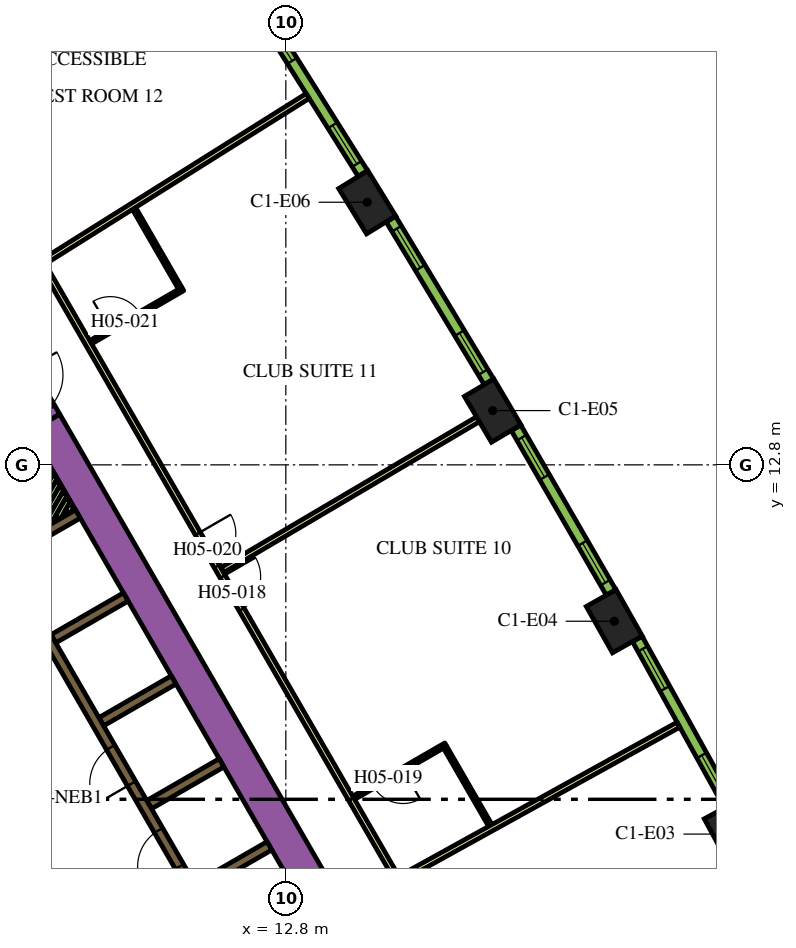
"""IFC4 building model, lengths in metres.
Left out: names, types, materials, properties, quantities, classifications, styles, units other than length and angle.
Written with IfcOpenShell. Run it as: python <this file> out.ifc"""

import sys

from ifc_helpers import new_model, si_unit, direction, frame, frame_2d, origin, origin_2d, place, context, subcontext, project, spatial, rectangle, extrude, element, fill, save


model = new_model("IFC4")
c1 = context("Model", 3, precision=1e-05, world=origin(), true_north=direction((0.0, 1.0)))
c2 = subcontext(c1, "Body", "Model", "MODEL_VIEW")
j1 = project(units=[si_unit("LENGTHUNIT", "METRE"), si_unit("PLANEANGLEUNIT", "RADIAN")], contexts=[c1])
p1 = place(None, origin())
s1 = spatial("IfcSite", under=j1, at=p1, CompositionType="ELEMENT")
p2 = place(p1, origin())
s2 = spatial("IfcBuilding", under=s1, at=p2, CompositionType="ELEMENT")
p3 = place(p2, frame((0.0, 0.0, 74.4)))
s3 = spatial("IfcBuildingStorey", under=s2, at=p3, CompositionType="ELEMENT", Elevation=74.4)
for number, where, z_axis, x_axis in (
    (1, (24.54, 3.085, 0.0), (0.0, 0.0, 1.0), (-0.476, 0.88, 0.0)),
    (2, (21.443, 8.685, 0.0), (0.0, 0.0, 1.0), (-0.492, 0.871, 0.0)),
    (3, (18.243, 14.228, 0.0), (0.0, 0.0, 1.0), (-0.508, 0.861, 0.0)),
    (4, (14.942, 19.71, 0.0), (0.0, 0.0, 1.0), (-0.524, 0.852, 0.0)),
):
    element("IfcColumn", number, at=place(p3, frame(where, z_axis=z_axis, x_axis=x_axis)), inside=s3, PredefinedType="COLUMN", context=c2, shape_type="SweptSolid", body=[
        extrude(rectangle(XDim=1.4, YDim=0.9, at=origin_2d()), origin(), (0.0, 0.0, 1.0), 3.9),
    ])
p4 = place(p3, frame((6.461, 13.909, 0.0), z_axis=(0.0, 0.0, 1.0), x_axis=(0.500005804227, -0.866022052686, 0.0)))
e5 = element("IfcWall", 5, at=p4, inside=s3, PredefinedType="SOLIDWALL", context=c2, shape_type="SweptSolid", body=[
    extrude(rectangle(XDim=20.834, YDim=0.9, at=frame_2d((10.417, 0.0))), origin(), (0.0, 0.0, 1.0), 3.9),
])
for number, where, z_axis, x_axis in (
    (6, (10.464, 1.677, 0.0), (0.0, 0.0, 1.0), (0.866, 0.5, 0.0)),
    (7, (9.204, 3.859, 0.0), (0.0, 0.0, 1.0), (0.866, 0.5, 0.0)),
    (8, (7.944, 6.041, 0.0), (0.0, 0.0, 1.0), (0.866, 0.5, 0.0)),
    (9, (6.684, 8.224, 0.0), (0.0, 0.0, 1.0), (0.866, 0.5, 0.0)),
):
    element("IfcWall", number, at=place(p3, frame(where, z_axis=z_axis, x_axis=x_axis)), inside=s3, PredefinedType="SOLIDWALL", context=c2, shape_type="SweptSolid", body=[
        extrude(rectangle(XDim=2.2, YDim=0.25, at=frame_2d((1.1, 0.0))), origin(), (0.0, 0.0, 1.0), 3.9),
    ])
p5 = place(p3, frame((4.776, 10.032, 0.0), z_axis=(0.0, 0.0, 1.0), x_axis=(0.86600215702, 0.500040262416, 0.0)))
e10 = element("IfcWall", 10, at=p5, inside=s3, PredefinedType="SOLIDWALL", context=c2, shape_type="SweptSolid", body=[
    extrude(rectangle(XDim=2.948, YDim=0.25, at=frame_2d((1.474, 0.0))), origin(), (0.0, 0.0, 1.0), 3.9),
])
p6 = place(p3, frame((5.501, 10.659, 0.0), z_axis=(0.0, 0.0, 1.0), x_axis=(0.499951092774, 0.866053638543, 0.0)))
e11 = element("IfcWall", 11, at=p6, inside=s3, PredefinedType="PARTITIONING", context=c2, shape_type="SweptSolid", body=[
    extrude(rectangle(XDim=2.28, YDim=0.15, at=frame_2d((1.14, 0.0))), origin(), (0.0, 0.0, 1.0), 2.7),
])
p7 = place(p3, frame((5.761, 10.809, 0.0), z_axis=(0.0, 0.0, 1.0), x_axis=(0.499900985997, 0.866082561999, 0.0)))
e12 = element("IfcWall", 12, at=p7, inside=s3, PredefinedType="PARTITIONING", context=c2, shape_type="SweptSolid", body=[
    extrude(rectangle(XDim=1.934, YDim=0.15, at=frame_2d((0.967, 0.0))), origin(), (0.0, 0.0, 1.0), 2.7),
])
p8 = place(p3, frame((6.021, 10.959, 0.0), z_axis=(0.0, 0.0, 1.0), x_axis=(0.499944387978, 0.86605750902, 0.0)))
e13 = element("IfcWall", 13, at=p8, inside=s3, PredefinedType="PARTITIONING", context=c2, shape_type="SweptSolid", body=[
    extrude(rectangle(XDim=1.587, YDim=0.15, at=frame_2d((0.793, 0.0))), origin(), (0.0, 0.0, 1.0), 2.7),
])
p9 = place(p3, frame((6.281, 11.109, 0.0), z_axis=(0.0, 0.0, 1.0), x_axis=(0.500012022864, 0.866018462269, 0.0)))
e14 = element("IfcWall", 14, at=p9, inside=s3, PredefinedType="PARTITIONING", context=c2, shape_type="SweptSolid", body=[
    extrude(rectangle(XDim=1.241, YDim=0.15, at=frame_2d((0.62, 0.0))), origin(), (0.0, 0.0, 1.0), 2.7),
])
p10 = place(p3, frame((6.541, 11.259, 0.0), z_axis=(0.0, 0.0, 1.0), x_axis=(0.500132045864, 0.865949153646, 0.0)))
e15 = element("IfcWall", 15, at=p10, inside=s3, PredefinedType="PARTITIONING", context=c2, shape_type="SweptSolid", body=[
    extrude(rectangle(XDim=0.894, YDim=0.15, at=frame_2d((0.447, 0.0))), origin(), (0.0, 0.0, 1.0), 2.7),
])
p11 = place(p3, frame((6.8, 11.409, 0.0), z_axis=(0.0, 0.0, 1.0), x_axis=(0.500210807569, 0.865903659763, 0.0)))
e16 = element("IfcWall", 16, at=p11, inside=s3, PredefinedType="PARTITIONING", context=c2, shape_type="SweptSolid", body=[
    extrude(rectangle(XDim=0.548, YDim=0.15, at=frame_2d((0.274, 0.0))), origin(), (0.0, 0.0, 1.0), 2.7),
])
p12 = place(p3, frame((7.06, 11.559, 0.0), z_axis=(0.0, 0.0, 1.0), x_axis=(0.499267785915, 0.866447735266, 0.0)))
e17 = element("IfcWall", 17, at=p12, inside=s3, PredefinedType="PARTITIONING", context=c2, shape_type="SweptSolid", body=[
    extrude(rectangle(XDim=0.201, YDim=0.15, at=frame_2d((0.101, 0.0))), origin(), (0.0, 0.0, 1.0), 2.7),
])
p13 = place(p3, frame((11.553, -0.46, 0.0), z_axis=(0.0, 0.0, 1.0), x_axis=(-0.500006514828, 0.866021642414, 0.0)))
e18 = element("IfcWall", 18, at=p13, inside=s3, PredefinedType="SOLIDWALL", context=c2, shape_type="SweptSolid", body=[
    extrude(rectangle(XDim=12.35, YDim=0.25, at=frame_2d((6.175, 0.0))), origin(), (0.0, 0.0, 1.0), 3.9),
])
p14 = place(p13, frame((0.585, 0.0, 0.0)))
e19 = element("IfcOpeningElement", 19, at=p14, cuts=e18, PredefinedType="OPENING", context=c2, shape_type="SweptSolid", body=[
    extrude(rectangle(XDim=1.1, YDim=2.1, at=frame_2d((0.55, 1.05))), frame((0.0, 0.135, 0.0), z_axis=(0.0, -1.0, 0.0), x_axis=(1.0, 0.0, 0.0)), (0.0, 0.0, 1.0), 0.27),
])
p15 = place(p13, frame((3.105, 0.0, 0.0)))
e20 = element("IfcOpeningElement", 20, at=p15, cuts=e18, PredefinedType="OPENING", context=c2, shape_type="SweptSolid", body=[
    extrude(rectangle(XDim=1.1, YDim=2.1, at=frame_2d((0.55, 1.05))), frame((0.0, 0.135, 0.0), z_axis=(0.0, -1.0, 0.0), x_axis=(1.0, 0.0, 0.0)), (0.0, 0.0, 1.0), 0.27),
])
p16 = place(p13, frame((5.625, 0.0, 0.0)))
e21 = element("IfcOpeningElement", 21, at=p16, cuts=e18, PredefinedType="OPENING", context=c2, shape_type="SweptSolid", body=[
    extrude(rectangle(XDim=1.1, YDim=2.1, at=frame_2d((0.55, 1.05))), frame((0.0, 0.135, 0.0), z_axis=(0.0, -1.0, 0.0), x_axis=(1.0, 0.0, 0.0)), (0.0, 0.0, 1.0), 0.27),
])
p17 = place(p3, frame((8.565, -2.185, 0.0), z_axis=(0.0, 0.0, 1.0), x_axis=(-0.499997954832, 0.866026584559, 0.0)))
e22 = element("IfcWall", 22, at=p17, inside=s3, PredefinedType="SOLIDWALL", context=c2, shape_type="SweptSolid", body=[
    extrude(rectangle(XDim=12.35, YDim=0.25, at=frame_2d((6.175, 0.0))), origin(), (0.0, 0.0, 1.0), 3.9),
])
p18 = place(p17, frame((5.725, 0.0, 0.0)))
e23 = element("IfcOpeningElement", 23, at=p18, cuts=e22, PredefinedType="OPENING", context=c2, shape_type="SweptSolid", body=[
    extrude(rectangle(XDim=0.9, YDim=2.1, at=frame_2d((0.45, 1.05))), frame((0.0, 0.135, 0.0), z_axis=(0.0, -1.0, 0.0), x_axis=(1.0, 0.0, 0.0)), (0.0, 0.0, 1.0), 0.27),
])
p19 = place(p3, frame((5.611, 15.382, 0.0), z_axis=(0.0, 0.0, 1.0), x_axis=(0.500062241894, -0.865989465428, 0.0)))
e24 = element("IfcWall", 24, at=p19, inside=s3, PredefinedType="SOLIDWALL", context=c2, shape_type="SweptSolid", body=[
    extrude(rectangle(XDim=1.7, YDim=0.9, at=frame_2d((0.85, 0.0))), origin(), (0.0, 0.0, 1.0), 3.9),
])
p20 = place(p19, frame((0.25, 0.0, 0.0)))
e25 = element("IfcOpeningElement", 25, at=p20, cuts=e24, PredefinedType="OPENING", context=c2, shape_type="SweptSolid", body=[
    extrude(rectangle(XDim=1.2, YDim=2.1, at=frame_2d((0.6, 1.05))), frame((0.0, 0.46, 0.0), z_axis=(0.0, -1.0, 0.0), x_axis=(1.0, 0.0, 0.0)), (0.0, 0.0, 1.0), 0.92),
])
p21 = place(p3, frame((6.163, 18.475, 0.0), z_axis=(0.0, 0.0, 1.0), x_axis=(0.500001317485, -0.866024643133, 0.0)))
e26 = element("IfcWall", 26, at=p21, inside=s3, PredefinedType="PARTITIONING", context=c2, shape_type="SweptSolid", body=[
    extrude(rectangle(XDim=25.767, YDim=0.15, at=frame_2d((12.883, 0.0))), origin(), (0.0, 0.0, 1.0), 2.7),
])
p22 = place(p21, frame((21.953, 0.0, 0.0)))
e27 = element("IfcOpeningElement", 27, at=p22, cuts=e26, PredefinedType="OPENING", context=c2, shape_type="SweptSolid", body=[
    extrude(rectangle(XDim=1.0, YDim=2.1, at=frame_2d((0.5, 1.05))), frame((0.0, 0.085, 0.0), z_axis=(0.0, -1.0, 0.0), x_axis=(1.0, 0.0, 0.0)), (0.0, 0.0, 1.0), 0.17),
])
p23 = place(p21, frame((9.948, 0.0, 0.0)))
e28 = element("IfcOpeningElement", 28, at=p23, cuts=e26, PredefinedType="OPENING", context=c2, shape_type="SweptSolid", body=[
    extrude(rectangle(XDim=1.0, YDim=2.1, at=frame_2d((0.5, 1.05))), frame((0.0, 0.085, 0.0), z_axis=(0.0, -1.0, 0.0), x_axis=(1.0, 0.0, 0.0)), (0.0, 0.0, 1.0), 0.17),
])
p24 = place(p21, frame((8.641, 0.0, 0.0)))
e29 = element("IfcOpeningElement", 29, at=p24, cuts=e26, PredefinedType="OPENING", context=c2, shape_type="SweptSolid", body=[
    extrude(rectangle(XDim=1.0, YDim=2.1, at=frame_2d((0.5, 1.05))), frame((0.0, 0.085, 0.0), z_axis=(0.0, -1.0, 0.0), x_axis=(1.0, 0.0, 0.0)), (0.0, 0.0, 1.0), 0.17),
])
p25 = place(p3, frame((9.922, 27.896, 0.0), z_axis=(0.0, 0.0, 1.0), x_axis=(-0.836970816595, -0.547247523675, 0.0)))
e30 = element("IfcWall", 30, at=p25, inside=s3, PredefinedType="PARTITIONING", context=c2, shape_type="SweptSolid", body=[
    extrude(rectangle(XDim=10.729, YDim=0.15, at=frame_2d((5.364, 0.0))), origin(), (0.0, 0.0, 1.0), 2.7),
])
p26 = place(p3, frame((13.376, 22.506, 0.0), z_axis=(0.0, 0.0, 1.0), x_axis=(-0.846945608893, -0.531679542183, 0.0)))
e31 = element("IfcWall", 31, at=p26, inside=s3, PredefinedType="PARTITIONING", context=c2, shape_type="SweptSolid", body=[
    extrude(rectangle(XDim=8.182, YDim=0.15, at=frame_2d((4.091, 0.0))), origin(), (0.0, 0.0, 1.0), 2.7),
])
p27 = place(p3, frame((17.856, 13.999, 0.0), z_axis=(0.0, 0.0, 1.0), x_axis=(-0.861371519381, -0.507975497047, 0.0)))
e32 = element("IfcWall", 32, at=p27, inside=s3, PredefinedType="PARTITIONING", context=c2, shape_type="SweptSolid", body=[
    extrude(rectangle(XDim=7.804, YDim=0.15, at=frame_2d((3.902, 0.0))), origin(), (0.0, 0.0, 1.0), 2.7),
])
p28 = place(p3, frame((23.132, 5.962, 0.0), z_axis=(0.0, 0.0, 1.0), x_axis=(-0.875121716713, -0.483902863121, 0.0)))
e33 = element("IfcWall", 33, at=p28, inside=s3, PredefinedType="PARTITIONING", context=c2, shape_type="SweptSolid", body=[
    extrude(rectangle(XDim=8.355, YDim=0.15, at=frame_2d((4.178, 0.0))), origin(), (0.0, 0.0, 1.0), 2.7),
])
p29 = place(p3, frame((17.009, 5.439, 0.0), z_axis=(0.0, 0.0, 1.0), x_axis=(-0.865996816683, -0.500049511043, 0.0)))
e34 = element("IfcWall", 34, at=p29, inside=s3, PredefinedType="PARTITIONING", context=c2, shape_type="SweptSolid", body=[
    extrude(rectangle(XDim=2.8, YDim=0.1, at=frame_2d((1.4, 0.0))), origin(), (0.0, 0.0, 1.0), 2.7),
])
p30 = place(p29, frame((1.3, 0.0, 0.0)))
e35 = element("IfcOpeningElement", 35, at=p30, cuts=e34, PredefinedType="OPENING", context=c2, shape_type="SweptSolid", body=[
    extrude(rectangle(XDim=0.9, YDim=2.1, at=frame_2d((0.45, 1.05))), frame((0.0, 0.06, 0.0), z_axis=(0.0, -1.0, 0.0), x_axis=(1.0, 0.0, 0.0)), (0.0, 0.0, 1.0), 0.12),
])
p31 = place(p3, frame((16.991, 5.371, 0.0), z_axis=(0.0, 0.0, 1.0), x_axis=(0.499939447199, -0.866060361138, 0.0)))
e36 = element("IfcWall", 36, at=p31, inside=s3, PredefinedType="PARTITIONING", context=c2, shape_type="SweptSolid", body=[
    extrude(rectangle(XDim=2.37, YDim=0.1, at=frame_2d((1.185, 0.0))), origin(), (0.0, 0.0, 1.0), 2.7),
])
p32 = place(p3, frame((7.664, 16.026, 0.0), z_axis=(0.0, 0.0, 1.0), x_axis=(0.866034573852, 0.49998411664, 0.0)))
e37 = element("IfcWall", 37, at=p32, inside=s3, PredefinedType="PARTITIONING", context=c2, shape_type="SweptSolid", body=[
    extrude(rectangle(XDim=2.8, YDim=0.1, at=frame_2d((1.4, 0.0))), origin(), (0.0, 0.0, 1.0), 2.7),
])
p33 = place(p32, frame((0.6, 0.0, 0.0)))
e38 = element("IfcOpeningElement", 38, at=p33, cuts=e37, PredefinedType="OPENING", context=c2, shape_type="SweptSolid", body=[
    extrude(rectangle(XDim=0.9, YDim=2.1, at=frame_2d((0.45, 1.05))), frame((0.0, 0.06, 0.0), z_axis=(0.0, -1.0, 0.0), x_axis=(1.0, 0.0, 0.0)), (0.0, 0.0, 1.0), 0.12),
])
p34 = place(p3, frame((10.02, 17.444, 0.0), z_axis=(0.0, 0.0, 1.0), x_axis=(-0.499958230738, 0.866049517936, 0.0)))
e39 = element("IfcWall", 39, at=p34, inside=s3, PredefinedType="PARTITIONING", context=c2, shape_type="SweptSolid", body=[
    extrude(rectangle(XDim=2.42, YDim=0.1, at=frame_2d((1.21, 0.0))), origin(), (0.0, 0.0, 1.0), 2.7),
])
p35 = place(p3, frame((24.468, 3.846, 0.0), z_axis=(0.0, 0.0, 1.0), x_axis=(-0.483912572871, 0.875116347589, 0.0)))
e40 = element("IfcWall", 40, at=p35, inside=s3, PredefinedType="SOLIDWALL", context=c2, shape_type="SweptSolid", body=[
    extrude(rectangle(XDim=4.998, YDim=0.29, at=frame_2d((2.499, 0.0))), origin(), (0.0, 0.0, 1.0), 3.6),
])
p36 = place(p35, frame((0.297, 0.0, 0.9)))
e41 = element("IfcOpeningElement", 41, at=p36, cuts=e40, PredefinedType="OPENING", context=c2, shape_type="SweptSolid", body=[
    extrude(rectangle(XDim=1.2, YDim=2.15, at=frame_2d((0.6, 1.075))), frame((0.0, 0.155, 0.0), z_axis=(0.0, -1.0, 0.0), x_axis=(1.0, 0.0, 0.0)), (0.0, 0.0, 1.0), 0.31),
])
p37 = place(p35, frame((3.501, 0.0, 0.9)))
e42 = element("IfcOpeningElement", 42, at=p37, cuts=e40, PredefinedType="OPENING", context=c2, shape_type="SweptSolid", body=[
    extrude(rectangle(XDim=1.2, YDim=2.15, at=frame_2d((0.6, 1.075))), frame((0.0, 0.155, 0.0), z_axis=(0.0, -1.0, 0.0), x_axis=(1.0, 0.0, 0.0)), (0.0, 0.0, 1.0), 0.31),
])
p38 = place(p3, frame((21.357, 9.445, 0.0), z_axis=(0.0, 0.0, 1.0), x_axis=(-0.50002123722, 0.866013142123, 0.0)))
e43 = element("IfcWall", 43, at=p38, inside=s3, PredefinedType="SOLIDWALL", context=c2, shape_type="SweptSolid", body=[
    extrude(rectangle(XDim=4.998, YDim=0.29, at=frame_2d((2.499, 0.0))), origin(), (0.0, 0.0, 1.0), 3.6),
])
p39 = place(p38, frame((0.297, 0.0, 0.9)))
e44 = element("IfcOpeningElement", 44, at=p39, cuts=e43, PredefinedType="OPENING", context=c2, shape_type="SweptSolid", body=[
    extrude(rectangle(XDim=1.2, YDim=2.15, at=frame_2d((0.6, 1.075))), frame((0.0, 0.155, 0.0), z_axis=(0.0, -1.0, 0.0), x_axis=(1.0, 0.0, 0.0)), (0.0, 0.0, 1.0), 0.31),
])
p40 = place(p38, frame((3.501, 0.0, 0.9)))
e45 = element("IfcOpeningElement", 45, at=p40, cuts=e43, PredefinedType="OPENING", context=c2, shape_type="SweptSolid", body=[
    extrude(rectangle(XDim=1.2, YDim=2.15, at=frame_2d((0.6, 1.075))), frame((0.0, 0.155, 0.0), z_axis=(0.0, -1.0, 0.0), x_axis=(1.0, 0.0, 0.0)), (0.0, 0.0, 1.0), 0.31),
])
p41 = place(p3, frame((18.143, 14.986, 0.0), z_axis=(0.0, 0.0, 1.0), x_axis=(-0.515938796285, 0.856625448191, 0.0)))
e46 = element("IfcWall", 46, at=p41, inside=s3, PredefinedType="SOLIDWALL", context=c2, shape_type="SweptSolid", body=[
    extrude(rectangle(XDim=4.998, YDim=0.29, at=frame_2d((2.499, 0.0))), origin(), (0.0, 0.0, 1.0), 3.6),
])
p42 = place(p41, frame((0.297, 0.0, 0.9)))
e47 = element("IfcOpeningElement", 47, at=p42, cuts=e46, PredefinedType="OPENING", context=c2, shape_type="SweptSolid", body=[
    extrude(rectangle(XDim=1.2, YDim=2.15, at=frame_2d((0.6, 1.075))), frame((0.0, 0.155, 0.0), z_axis=(0.0, -1.0, 0.0), x_axis=(1.0, 0.0, 0.0)), (0.0, 0.0, 1.0), 0.31),
])
p43 = place(p41, frame((3.501, 0.0, 0.9)))
e48 = element("IfcOpeningElement", 48, at=p43, cuts=e46, PredefinedType="OPENING", context=c2, shape_type="SweptSolid", body=[
    extrude(rectangle(XDim=1.2, YDim=2.15, at=frame_2d((0.6, 1.075))), frame((0.0, 0.155, 0.0), z_axis=(0.0, -1.0, 0.0), x_axis=(1.0, 0.0, 0.0)), (0.0, 0.0, 1.0), 0.31),
])
p44 = place(p3, frame((14.827, 20.466, 0.0), z_axis=(0.0, 0.0, 1.0), x_axis=(-0.531688286542, 0.846940119462, 0.0)))
e49 = element("IfcWall", 49, at=p44, inside=s3, PredefinedType="SOLIDWALL", context=c2, shape_type="SweptSolid", body=[
    extrude(rectangle(XDim=4.998, YDim=0.29, at=frame_2d((2.499, 0.0))), origin(), (0.0, 0.0, 1.0), 3.6),
])
p45 = place(p44, frame((0.297, 0.0, 0.9)))
e50 = element("IfcOpeningElement", 50, at=p45, cuts=e49, PredefinedType="OPENING", context=c2, shape_type="SweptSolid", body=[
    extrude(rectangle(XDim=1.2, YDim=2.15, at=frame_2d((0.6, 1.075))), frame((0.0, 0.155, 0.0), z_axis=(0.0, -1.0, 0.0), x_axis=(1.0, 0.0, 0.0)), (0.0, 0.0, 1.0), 0.31),
])
p46 = place(p44, frame((3.501, 0.0, 0.9)))
e51 = element("IfcOpeningElement", 51, at=p46, cuts=e49, PredefinedType="OPENING", context=c2, shape_type="SweptSolid", body=[
    extrude(rectangle(XDim=1.2, YDim=2.15, at=frame_2d((0.6, 1.075))), frame((0.0, 0.155, 0.0), z_axis=(0.0, -1.0, 0.0), x_axis=(1.0, 0.0, 0.0)), (0.0, 0.0, 1.0), 0.31),
])
p47 = place(p15, origin())
e52 = element("IfcDoor", 52, at=p47, inside=s3, OperationType="DOUBLE_DOOR_SLIDING", PredefinedType="DOOR", context=c2, shape_type="SweptSolid", body=[
    extrude(rectangle(XDim=1.1, YDim=2.1, at=frame_2d((0.55, 1.05))), frame((0.0, 0.025, 0.0), z_axis=(0.0, -1.0, 0.0), x_axis=(1.0, 0.0, 0.0)), (0.0, 0.0, 1.0), 0.05),
])
fill(e20, e52)
p48 = place(p16, origin())
e53 = element("IfcDoor", 53, at=p48, inside=s3, OperationType="DOUBLE_DOOR_SLIDING", PredefinedType="DOOR", context=c2, shape_type="SweptSolid", body=[
    extrude(rectangle(XDim=1.1, YDim=2.1, at=frame_2d((0.55, 1.05))), frame((0.0, 0.025, 0.0), z_axis=(0.0, -1.0, 0.0), x_axis=(1.0, 0.0, 0.0)), (0.0, 0.0, 1.0), 0.05),
])
fill(e21, e53)
p49 = place(p23, origin())
e54 = element("IfcDoor", 54, at=p49, inside=s3, OperationType="SINGLE_SWING_LEFT", PredefinedType="DOOR", context=c2, shape_type="SweptSolid", body=[
    extrude(rectangle(XDim=1.0, YDim=2.1, at=frame_2d((0.5, 1.05))), frame((0.0, 0.025, 0.0), z_axis=(0.0, -1.0, 0.0), x_axis=(1.0, 0.0, 0.0)), (0.0, 0.0, 1.0), 0.05),
])
fill(e28, e54)
p50 = place(p30, origin())
e55 = element("IfcDoor", 55, at=p50, inside=s3, OperationType="SINGLE_SWING_LEFT", PredefinedType="DOOR", context=c2, shape_type="SweptSolid", body=[
    extrude(rectangle(XDim=0.9, YDim=2.1, at=frame_2d((0.45, 1.05))), frame((0.0, 0.025, 0.0), z_axis=(0.0, -1.0, 0.0), x_axis=(1.0, 0.0, 0.0)), (0.0, 0.0, 1.0), 0.05),
])
fill(e35, e55)
p51 = place(p24, origin())
e56 = element("IfcDoor", 56, at=p51, inside=s3, OperationType="SINGLE_SWING_RIGHT", PredefinedType="DOOR", context=c2, shape_type="SweptSolid", body=[
    extrude(rectangle(XDim=1.0, YDim=2.1, at=frame_2d((0.5, 1.05))), frame((0.0, 0.025, 0.0), z_axis=(0.0, -1.0, 0.0), x_axis=(1.0, 0.0, 0.0)), (0.0, 0.0, 1.0), 0.05),
])
fill(e29, e56)
p52 = place(p33, origin())
e57 = element("IfcDoor", 57, at=p52, inside=s3, OperationType="SINGLE_SWING_LEFT", PredefinedType="DOOR", context=c2, shape_type="SweptSolid", body=[
    extrude(rectangle(XDim=0.9, YDim=2.1, at=frame_2d((0.45, 1.05))), frame((0.0, 0.025, 0.0), z_axis=(0.0, -1.0, 0.0), x_axis=(1.0, 0.0, 0.0)), (0.0, 0.0, 1.0), 0.05),
])
fill(e38, e57)
p53 = place(p36, origin())
e58 = element("IfcWindow", 58, at=p53, inside=s3, PartitioningType="DOUBLE_PANEL_VERTICAL", PredefinedType="WINDOW", context=c2, shape_type="SweptSolid", body=[
    extrude(rectangle(XDim=1.2, YDim=2.15, at=frame_2d((0.6, 1.075))), frame((0.0, 0.015, 0.0), z_axis=(0.0, -1.0, 0.0), x_axis=(1.0, 0.0, 0.0)), (0.0, 0.0, 1.0), 0.06),
])
fill(e41, e58)
p54 = place(p37, origin())
e59 = element("IfcWindow", 59, at=p54, inside=s3, PartitioningType="DOUBLE_PANEL_VERTICAL", PredefinedType="WINDOW", context=c2, shape_type="SweptSolid", body=[
    extrude(rectangle(XDim=1.2, YDim=2.15, at=frame_2d((0.6, 1.075))), frame((0.0, 0.015, 0.0), z_axis=(0.0, -1.0, 0.0), x_axis=(1.0, 0.0, 0.0)), (0.0, 0.0, 1.0), 0.06),
])
fill(e42, e59)
p55 = place(p39, origin())
e60 = element("IfcWindow", 60, at=p55, inside=s3, PartitioningType="DOUBLE_PANEL_VERTICAL", PredefinedType="WINDOW", context=c2, shape_type="SweptSolid", body=[
    extrude(rectangle(XDim=1.2, YDim=2.15, at=frame_2d((0.6, 1.075))), frame((0.0, 0.015, 0.0), z_axis=(0.0, -1.0, 0.0), x_axis=(1.0, 0.0, 0.0)), (0.0, 0.0, 1.0), 0.06),
])
fill(e44, e60)
p56 = place(p40, origin())
e61 = element("IfcWindow", 61, at=p56, inside=s3, PartitioningType="DOUBLE_PANEL_VERTICAL", PredefinedType="WINDOW", context=c2, shape_type="SweptSolid", body=[
    extrude(rectangle(XDim=1.2, YDim=2.15, at=frame_2d((0.6, 1.075))), frame((0.0, 0.015, 0.0), z_axis=(0.0, -1.0, 0.0), x_axis=(1.0, 0.0, 0.0)), (0.0, 0.0, 1.0), 0.06),
])
fill(e45, e61)
p57 = place(p42, origin())
e62 = element("IfcWindow", 62, at=p57, inside=s3, PartitioningType="DOUBLE_PANEL_VERTICAL", PredefinedType="WINDOW", context=c2, shape_type="SweptSolid", body=[
    extrude(rectangle(XDim=1.2, YDim=2.15, at=frame_2d((0.6, 1.075))), frame((0.0, 0.015, 0.0), z_axis=(0.0, -1.0, 0.0), x_axis=(1.0, 0.0, 0.0)), (0.0, 0.0, 1.0), 0.06),
])
fill(e47, e62)
p58 = place(p43, origin())
e63 = element("IfcWindow", 63, at=p58, inside=s3, PartitioningType="DOUBLE_PANEL_VERTICAL", PredefinedType="WINDOW", context=c2, shape_type="SweptSolid", body=[
    extrude(rectangle(XDim=1.2, YDim=2.15, at=frame_2d((0.6, 1.075))), frame((0.0, 0.015, 0.0), z_axis=(0.0, -1.0, 0.0), x_axis=(1.0, 0.0, 0.0)), (0.0, 0.0, 1.0), 0.06),
])
fill(e48, e63)
p59 = place(p45, origin())
e64 = element("IfcWindow", 64, at=p59, inside=s3, PartitioningType="DOUBLE_PANEL_VERTICAL", PredefinedType="WINDOW", context=c2, shape_type="SweptSolid", body=[
    extrude(rectangle(XDim=1.2, YDim=2.15, at=frame_2d((0.6, 1.075))), frame((0.0, 0.015, 0.0), z_axis=(0.0, -1.0, 0.0), x_axis=(1.0, 0.0, 0.0)), (0.0, 0.0, 1.0), 0.06),
])
fill(e50, e64)
p60 = place(p46, origin())
e65 = element("IfcWindow", 65, at=p60, inside=s3, PartitioningType="DOUBLE_PANEL_VERTICAL", PredefinedType="WINDOW", context=c2, shape_type="SweptSolid", body=[
    extrude(rectangle(XDim=1.2, YDim=2.15, at=frame_2d((0.6, 1.075))), frame((0.0, 0.015, 0.0), z_axis=(0.0, -1.0, 0.0), x_axis=(1.0, 0.0, 0.0)), (0.0, 0.0, 1.0), 0.06),
])
fill(e51, e65)
save(model, sys.argv[1])
